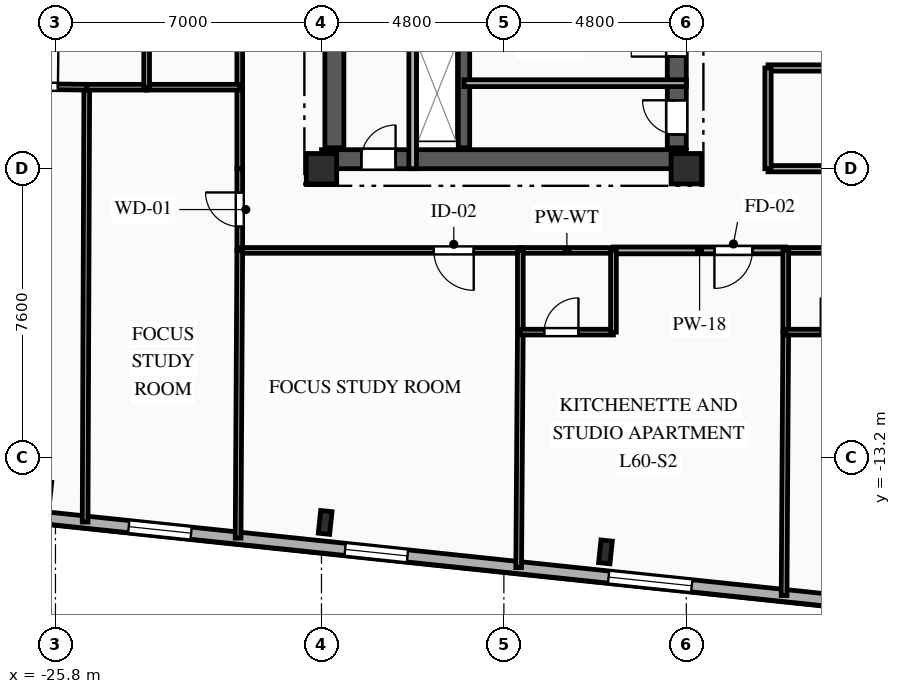
"""IFC4 building model, lengths in metres.
Left out: names, types, materials, properties, quantities, classifications, styles, units other than length and angle.
Written with IfcOpenShell. Run it as: python <this file> out.ifc"""

import sys

from ifc_helpers import new_model, si_unit, direction, frame, frame_2d, origin, origin_2d, place, context, subcontext, project, spatial, rectangle, i_section, extrude, element, fill, save


model = new_model("IFC4")
c1 = context("Model", 3, precision=1e-05, world=origin(), true_north=direction((0.0, 1.0)))
c2 = subcontext(c1, "Body", "Model", "MODEL_VIEW")
j1 = project(units=[si_unit("LENGTHUNIT", "METRE"), si_unit("PLANEANGLEUNIT", "RADIAN")], contexts=[c1])
p1 = place(None, origin())
s1 = spatial("IfcSite", under=j1, at=p1, CompositionType="ELEMENT")
p2 = place(p1, origin())
s2 = spatial("IfcBuilding", under=s1, at=p2, CompositionType="ELEMENT")
p3 = place(p2, frame((0.0, 0.0, 213.15)))
s3 = spatial("IfcBuildingStorey", under=s2, at=p3, CompositionType="ELEMENT", Elevation=213.15)
for number, where, z_axis, x_axis in (
    (1, (-18.8, -5.6, 0.0), (0.0, 0.0, 1.0), (1.0, 0.0, 0.0)),
    (2, (-9.2, -5.6, 0.0), (0.0, 0.0, 1.0), (1.0, 0.0, 0.0)),
):
    element("IfcColumn", number, at=place(p3, frame(where, z_axis=z_axis, x_axis=x_axis)), inside=s3, PredefinedType="COLUMN", context=c2, shape_type="SweptSolid", body=[
        extrude(rectangle(XDim=0.8, YDim=0.8, at=origin_2d()), origin(), (0.0, 0.0, 1.0), 3.35),
    ])
for number, where, z_axis, x_axis in (
    (3, (-26.079, -14.133, 0.0), (0.0, 0.0, 1.0), (0.995, -0.105, 0.0)),
    (4, (-18.703, -14.908, 0.0), (0.0, 0.0, 1.0), (0.995, -0.105, 0.0)),
    (5, (-11.327, -15.683, 0.0), (0.0, 0.0, 1.0), (0.995, -0.105, 0.0)),
):
    element("IfcColumn", number, at=place(p3, frame(where, z_axis=z_axis, x_axis=x_axis)), inside=s3, PredefinedType="COLUMN", context=c2, shape_type="SweptSolid", body=[
        extrude(i_section(OverallWidth=0.3, OverallDepth=0.6, WebThickness=0.015, FlangeThickness=0.03, FilletRadius=0.027, at=origin_2d()), origin(), (0.0, 0.0, 1.0), 3.35),
    ])
p4 = place(p3, frame((18.756, -19.498, 0.0), z_axis=(0.0, 0.0, 1.0), x_axis=(-0.994522060044, 0.104526896475, 0.0)))
e6 = element("IfcWall", 6, at=p4, inside=s3, PredefinedType="SOLIDWALL", context=c2, shape_type="SweptSolid", body=[
    extrude(rectangle(XDim=45.8, YDim=0.32, at=frame_2d((22.9, 0.0))), origin(), (0.0, 0.0, 1.0), 3.04),
])
p5 = place(p4, frame((1.657, 0.0, 0.85)))
e7 = element("IfcOpeningElement", 7, at=p5, cuts=e6, PredefinedType="OPENING", context=c2, shape_type="SweptSolid", body=[
    extrude(rectangle(XDim=1.65, YDim=1.85, at=frame_2d((0.825, 0.925))), frame((0.0, 0.17, 0.0), z_axis=(0.0, -1.0, 0.0), x_axis=(1.0, 0.0, 0.0)), (0.0, 0.0, 1.0), 0.34),
])
p6 = place(p4, frame((6.907, 0.0, 0.85)))
e8 = element("IfcOpeningElement", 8, at=p6, cuts=e6, PredefinedType="OPENING", context=c2, shape_type="SweptSolid", body=[
    extrude(rectangle(XDim=2.2, YDim=1.85, at=frame_2d((1.1, 0.925))), frame((0.0, 0.17, 0.0), z_axis=(0.0, -1.0, 0.0), x_axis=(1.0, 0.0, 0.0)), (0.0, 0.0, 1.0), 0.34),
])
p7 = place(p4, frame((13.953, 0.0, 0.85)))
e9 = element("IfcOpeningElement", 9, at=p7, cuts=e6, PredefinedType="OPENING", context=c2, shape_type="SweptSolid", body=[
    extrude(rectangle(XDim=2.2, YDim=1.85, at=frame_2d((1.1, 0.925))), frame((0.0, 0.17, 0.0), z_axis=(0.0, -1.0, 0.0), x_axis=(1.0, 0.0, 0.0)), (0.0, 0.0, 1.0), 0.34),
])
p8 = place(p4, frame((20.959, 0.0, 0.85)))
e10 = element("IfcOpeningElement", 10, at=p8, cuts=e6, PredefinedType="OPENING", context=c2, shape_type="SweptSolid", body=[
    extrude(rectangle(XDim=2.2, YDim=1.85, at=frame_2d((1.1, 0.925))), frame((0.0, 0.17, 0.0), z_axis=(0.0, -1.0, 0.0), x_axis=(1.0, 0.0, 0.0)), (0.0, 0.0, 1.0), 0.34),
])
p9 = place(p4, frame((27.965, 0.0, 0.85)))
e11 = element("IfcOpeningElement", 11, at=p9, cuts=e6, PredefinedType="OPENING", context=c2, shape_type="SweptSolid", body=[
    extrude(rectangle(XDim=2.2, YDim=1.85, at=frame_2d((1.1, 0.925))), frame((0.0, 0.17, 0.0), z_axis=(0.0, -1.0, 0.0), x_axis=(1.0, 0.0, 0.0)), (0.0, 0.0, 1.0), 0.34),
])
p10 = place(p4, frame((35.487, 0.0, 0.85)))
e12 = element("IfcOpeningElement", 12, at=p10, cuts=e6, PredefinedType="OPENING", context=c2, shape_type="SweptSolid", body=[
    extrude(rectangle(XDim=1.65, YDim=1.85, at=frame_2d((0.825, 0.925))), frame((0.0, 0.17, 0.0), z_axis=(0.0, -1.0, 0.0), x_axis=(1.0, 0.0, 0.0)), (0.0, 0.0, 1.0), 0.34),
])
p11 = place(p4, frame((41.212, 0.0, 0.85)))
e13 = element("IfcOpeningElement", 13, at=p11, cuts=e6, PredefinedType="OPENING", context=c2, shape_type="SweptSolid", body=[
    extrude(rectangle(XDim=1.65, YDim=1.85, at=frame_2d((0.825, 0.925))), frame((0.0, 0.17, 0.0), z_axis=(0.0, -1.0, 0.0), x_axis=(1.0, 0.0, 0.0)), (0.0, 0.0, 1.0), 0.34),
])
p12 = place(p3, frame((-18.8, -5.35, 0.0), z_axis=(0.0, 0.0, 1.0), x_axis=(1.0, 0.0, 0.0)))
e14 = element("IfcWall", 14, at=p12, inside=s3, PredefinedType="SHEAR", context=c2, shape_type="SweptSolid", body=[
    extrude(rectangle(XDim=9.6, YDim=0.5, at=frame_2d((4.8, 0.0))), origin(), (0.0, 0.0, 1.0), 3.04),
])
p13 = place(p12, frame((1.05, 0.0, 0.0)))
e15 = element("IfcOpeningElement", 15, at=p13, cuts=e14, PredefinedType="OPENING", context=c2, shape_type="SweptSolid", body=[
    extrude(rectangle(XDim=0.9, YDim=2.1, at=frame_2d((0.45, 1.05))), frame((0.0, 0.26, 0.0), z_axis=(0.0, -1.0, 0.0), x_axis=(1.0, 0.0, 0.0)), (0.0, 0.0, 1.0), 0.52),
])
p14 = place(p3, frame((-18.46, -5.05, 0.0), z_axis=(0.0, 0.0, 1.0), x_axis=(0.0, 1.0, 0.0)))
e16 = element("IfcWall", 16, at=p14, inside=s3, PredefinedType="SHEAR", context=c2, shape_type="SweptSolid", body=[
    extrude(rectangle(XDim=10.1, YDim=0.5, at=frame_2d((5.05, 0.0))), origin(), (0.0, 0.0, 1.0), 3.04),
])
p15 = place(p3, frame((-9.45, -5.05, 0.0), z_axis=(0.0, 0.0, 1.0), x_axis=(0.0, 1.0, 0.0)))
e17 = element("IfcWall", 17, at=p15, inside=s3, PredefinedType="SHEAR", context=c2, shape_type="SweptSolid", body=[
    extrude(rectangle(XDim=10.1, YDim=0.5, at=frame_2d((5.05, 0.0))), origin(), (0.0, 0.0, 1.0), 3.04),
])
p16 = place(p15, frame((7.15, 0.0, 0.0)))
e18 = element("IfcOpeningElement", 18, at=p16, cuts=e17, PredefinedType="OPENING", context=c2, shape_type="SweptSolid", body=[
    extrude(rectangle(XDim=0.9, YDim=2.1, at=frame_2d((0.45, 1.05))), frame((0.0, 0.26, 0.0), z_axis=(0.0, -1.0, 0.0), x_axis=(1.0, 0.0, 0.0)), (0.0, 0.0, 1.0), 0.52),
])
p17 = place(p15, frame((2.4, 0.0, 0.0)))
e19 = element("IfcOpeningElement", 19, at=p17, cuts=e17, PredefinedType="OPENING", context=c2, shape_type="SweptSolid", body=[
    extrude(rectangle(XDim=1.2, YDim=2.15, at=frame_2d((0.6, 1.075))), frame((0.0, 0.26, 0.0), z_axis=(0.0, -1.0, 0.0), x_axis=(1.0, 0.0, 0.0)), (0.0, 0.0, 1.0), 0.52),
])
p18 = place(p15, frame((0.35, 0.0, 0.0)))
e20 = element("IfcOpeningElement", 20, at=p18, cuts=e17, PredefinedType="OPENING", context=c2, shape_type="SweptSolid", body=[
    extrude(rectangle(XDim=0.9, YDim=2.1, at=frame_2d((0.45, 1.05))), frame((0.0, 0.26, 0.0), z_axis=(0.0, -1.0, 0.0), x_axis=(1.0, 0.0, 0.0)), (0.0, 0.0, 1.0), 0.52),
])
p19 = place(p15, frame((5.0, 0.0, 0.0)))
e21 = element("IfcOpeningElement", 21, at=p19, cuts=e17, PredefinedType="OPENING", context=c2, shape_type="SweptSolid", body=[
    extrude(rectangle(XDim=0.9, YDim=2.1, at=frame_2d((0.45, 1.05))), frame((0.0, 0.26, 0.0), z_axis=(0.0, -1.0, 0.0), x_axis=(1.0, 0.0, 0.0)), (0.0, 0.0, 1.0), 0.52),
])
p20 = place(p3, frame((-15.05, -5.05, 0.0), z_axis=(0.0, 0.0, 1.0), x_axis=(0.0, 1.0, 0.0)))
e22 = element("IfcWall", 22, at=p20, inside=s3, PredefinedType="SHEAR", context=c2, shape_type="SweptSolid", body=[
    extrude(rectangle(XDim=10.1, YDim=0.3, at=frame_2d((5.05, 0.0))), origin(), (0.0, 0.0, 1.0), 3.04),
])
p21 = place(p3, frame((-16.4, -5.6, 0.0), z_axis=(0.0, 0.0, 1.0), x_axis=(0.0, 1.0, 0.0)))
e23 = element("IfcWall", 23, at=p21, inside=s3, PredefinedType="PARTITIONING", context=c2, shape_type="SweptSolid", body=[
    extrude(rectangle(XDim=3.49, YDim=0.2, at=frame_2d((1.745, 0.0))), origin(), (0.0, 0.0, 1.0), 3.04),
])
p22 = place(p3, frame((-15.05, -3.35, 0.0), z_axis=(0.0, 0.0, 1.0), x_axis=(1.0, 0.0, 0.0)))
e24 = element("IfcWall", 24, at=p22, inside=s3, PredefinedType="PARTITIONING", context=c2, shape_type="SweptSolid", body=[
    extrude(rectangle(XDim=5.85, YDim=0.18, at=frame_2d((2.925, 0.0))), origin(), (0.0, 0.0, 1.0), 2.755),
])
p23 = place(p3, frame((-20.95, -7.75, 0.0), z_axis=(0.0, 0.0, 1.0), x_axis=(0.0, 1.0, 0.0)))
e25 = element("IfcWall", 25, at=p23, inside=s3, PredefinedType="PARTITIONING", context=c2, shape_type="SweptSolid", body=[
    extrude(rectangle(XDim=2.15, YDim=0.15, at=frame_2d((1.075, 0.0))), origin(), (0.0, 0.0, 1.0), 3.04),
])
p24 = place(p23, frame((0.625, 0.0, 0.0)))
e26 = element("IfcOpeningElement", 26, at=p24, cuts=e25, PredefinedType="OPENING", context=c2, shape_type="SweptSolid", body=[
    extrude(rectangle(XDim=0.9, YDim=2.1, at=frame_2d((0.45, 1.05))), frame((0.0, 0.085, 0.0), z_axis=(0.0, -1.0, 0.0), x_axis=(1.0, 0.0, 0.0)), (0.0, 0.0, 1.0), 0.17),
])
p25 = place(p3, frame((-13.567, -7.75, 0.0), z_axis=(0.0, 0.0, 1.0), x_axis=(-1.0, 0.0, 0.0)))
e27 = element("IfcWall", 27, at=p25, inside=s3, PredefinedType="PARTITIONING", context=c2, shape_type="SweptSolid", body=[
    extrude(rectangle(XDim=7.383, YDim=0.15, at=frame_2d((3.691, 0.0))), origin(), (0.0, 0.0, 1.0), 3.04),
])
p26 = place(p25, frame((1.227, 0.0, 0.0)))
e28 = element("IfcOpeningElement", 28, at=p26, cuts=e27, PredefinedType="OPENING", context=c2, shape_type="SweptSolid", body=[
    extrude(rectangle(XDim=1.05, YDim=2.15, at=frame_2d((0.525, 1.075))), frame((0.0, 0.085, 0.0), z_axis=(0.0, -1.0, 0.0), x_axis=(1.0, 0.0, 0.0)), (0.0, 0.0, 1.0), 0.17),
])
p27 = place(p3, frame((-6.583, -7.75, 0.0), z_axis=(0.0, 0.0, 1.0), x_axis=(-1.0, 0.0, 0.0)))
e29 = element("IfcWall", 29, at=p27, inside=s3, PredefinedType="PARTITIONING", context=c2, shape_type="SweptSolid", body=[
    extrude(rectangle(XDim=4.534, YDim=0.18, at=frame_2d((2.267, 0.0))), origin(), (0.0, 0.0, 1.0), 3.04),
])
p28 = place(p27, frame((0.877, 0.0, 0.0)))
e30 = element("IfcOpeningElement", 30, at=p28, cuts=e29, PredefinedType="OPENING", context=c2, shape_type="SweptSolid", body=[
    extrude(rectangle(XDim=1.0, YDim=2.15, at=frame_2d((0.5, 1.075))), frame((0.0, 0.1, 0.0), z_axis=(0.0, -1.0, 0.0), x_axis=(1.0, 0.0, 0.0)), (0.0, 0.0, 1.0), 0.2),
])
for number, where, z_axis, x_axis in (
    (31, (-11.117, -7.75, 0.0), (0.0, 0.0, 1.0), (-1.0, 0.0, 0.0)),
    (32, (-4.133, -7.75, 0.0), (0.0, 0.0, 1.0), (-1.0, 0.0, 0.0)),
):
    element("IfcWall", number, at=place(p3, frame(where, z_axis=z_axis, x_axis=x_axis)), inside=s3, PredefinedType="PLUMBINGWALL", context=c2, shape_type="SweptSolid", body=[
        extrude(rectangle(XDim=2.45, YDim=0.15, at=frame_2d((1.225, 0.0))), origin(), (0.0, 0.0, 1.0), 3.04),
    ])
p29 = place(p3, frame((-7.05, -5.6, 0.0), z_axis=(0.0, 0.0, 1.0), x_axis=(1.0, 0.0, 0.0)))
e33 = element("IfcWall", 33, at=p29, inside=s3, PredefinedType="PARTITIONING", context=c2, shape_type="SweptSolid", body=[
    extrude(rectangle(XDim=7.05, YDim=0.165, at=frame_2d((3.525, 0.0))), origin(), (0.0, 0.0, 1.0), 2.525),
])
p30 = place(p3, frame((-20.95, -5.6, 0.0), z_axis=(0.0, 0.0, 1.0), x_axis=(0.0, 1.0, 0.0)))
e34 = element("IfcWall", 34, at=p30, inside=s3, PredefinedType="PARTITIONING", context=c2, shape_type="SweptSolid", body=[
    extrude(rectangle(XDim=2.144, YDim=0.15, at=frame_2d((1.072, 0.0))), origin(), (0.0, 0.0, 1.0), 3.04),
])
p31 = place(p3, frame((-20.95, -3.456, 0.0), z_axis=(0.0, 0.0, 1.0), x_axis=(0.0, 1.0, 0.0)))
e35 = element("IfcWall", 35, at=p31, inside=s3, PredefinedType="PLUMBINGWALL", context=c2, shape_type="SweptSolid", body=[
    extrude(rectangle(XDim=2.15, YDim=0.15, at=frame_2d((1.075, 0.0))), origin(), (0.0, 0.0, 1.0), 3.04),
])
p32 = place(p3, frame((7.05, -2.95, 0.0), z_axis=(0.0, 0.0, 1.0), x_axis=(-1.0, 0.0, 0.0)))
e36 = element("IfcWall", 36, at=p32, inside=s3, PredefinedType="PARTITIONING", context=c2, shape_type="SweptSolid", body=[
    extrude(rectangle(XDim=14.1, YDim=0.165, at=frame_2d((7.05, 0.0))), origin(), (0.0, 0.0, 1.0), 3.04),
])
p33 = place(p32, frame((6.475, 0.0, 0.0)))
e37 = element("IfcOpeningElement", 37, at=p33, cuts=e36, PredefinedType="OPENING", context=c2, shape_type="SweptSolid", body=[
    extrude(rectangle(XDim=1.15, YDim=2.15, at=frame_2d((0.575, 1.075))), frame((0.0, 0.093, 0.0), z_axis=(0.0, -1.0, 0.0), x_axis=(1.0, 0.0, 0.0)), (0.0, 0.0, 1.0), 0.185),
])
p34 = place(p3, frame((-7.05, -2.95, 0.0), z_axis=(0.0, 0.0, 1.0), x_axis=(0.0, -1.0, 0.0)))
e38 = element("IfcWall", 38, at=p34, inside=s3, PredefinedType="PARTITIONING", context=c2, shape_type="SweptSolid", body=[
    extrude(rectangle(XDim=2.65, YDim=0.165, at=frame_2d((1.325, 0.0))), origin(), (0.0, 0.0, 1.0), 3.04),
])
p35 = place(p3, frame((-24.976, -3.456, 0.0), z_axis=(0.0, 0.0, 1.0), x_axis=(-0.003840873, -0.99999262382, 0.0)))
e39 = element("IfcWall", 39, at=p35, inside=s3, PredefinedType="PARTITIONING", context=c2, shape_type="SweptSolid", body=[
    extrude(rectangle(XDim=11.441, YDim=0.15, at=frame_2d((5.721, 0.0))), origin(), (0.0, 0.0, 1.0), 3.04),
])
p36 = place(p3, frame((-28.622, -3.412, 0.0), z_axis=(0.0, 0.0, 1.0), x_axis=(0.999927389555, -0.01205054433, 0.0)))
e40 = element("IfcWall", 40, at=p36, inside=s3, PredefinedType="PARTITIONING", context=c2, shape_type="SweptSolid", body=[
    extrude(rectangle(XDim=3.647, YDim=0.15, at=frame_2d((1.823, 0.0))), origin(), (0.0, 0.0, 1.0), 3.04),
])
p37 = place(p36, frame((1.837, 0.0, 0.0)))
e41 = element("IfcOpeningElement", 41, at=p37, cuts=e40, PredefinedType="OPENING", context=c2, shape_type="SweptSolid", body=[
    extrude(rectangle(XDim=1.05, YDim=2.15, at=frame_2d((0.525, 1.075))), frame((0.0, 0.085, 0.0), z_axis=(0.0, -1.0, 0.0), x_axis=(1.0, 0.0, 0.0)), (0.0, 0.0, 1.0), 0.17),
])
p38 = place(p3, frame((-24.976, -3.456, 0.0), z_axis=(0.0, 0.0, 1.0), x_axis=(1.0, 0.0, 0.0)))
e42 = element("IfcWall", 42, at=p38, inside=s3, PredefinedType="PARTITIONING", context=c2, shape_type="SweptSolid", body=[
    extrude(rectangle(XDim=1.576, YDim=0.15, at=frame_2d((0.788, 0.0))), origin(), (0.0, 0.0, 1.0), 3.04),
])
p39 = place(p3, frame((-23.4, -3.456, 0.0), z_axis=(0.0, 0.0, 1.0), x_axis=(1.0, 0.0, 0.0)))
e43 = element("IfcWall", 43, at=p39, inside=s3, PredefinedType="PLUMBINGWALL", context=c2, shape_type="SweptSolid", body=[
    extrude(rectangle(XDim=2.45, YDim=0.15, at=frame_2d((1.225, 0.0))), origin(), (0.0, 0.0, 1.0), 3.04),
])
p40 = place(p3, frame((-20.95, -7.75, 0.0), z_axis=(0.0, 0.0, 1.0), x_axis=(-0.005804668564, -0.99998315277, 0.0)))
e44 = element("IfcWall", 44, at=p40, inside=s3, PredefinedType="PARTITIONING", context=c2, shape_type="SweptSolid", body=[
    extrude(rectangle(XDim=7.571, YDim=0.15, at=frame_2d((3.785, 0.0))), origin(), (0.0, 0.0, 1.0), 3.04),
])
p41 = place(p3, frame((-23.4, -1.306, 0.0), z_axis=(0.0, 0.0, 1.0), x_axis=(0.0, -1.0, 0.0)))
e45 = element("IfcWall", 45, at=p41, inside=s3, PredefinedType="PLUMBINGWALL", context=c2, shape_type="SweptSolid", body=[
    extrude(rectangle(XDim=2.15, YDim=0.15, at=frame_2d((1.075, 0.0))), origin(), (0.0, 0.0, 1.0), 2.695),
])
p42 = place(p3, frame((-13.567, -9.9, 0.0), z_axis=(0.0, 0.0, 1.0), x_axis=(-0.007091740814, -0.99997485329, 0.0)))
e46 = element("IfcWall", 46, at=p42, inside=s3, PredefinedType="PARTITIONING", context=c2, shape_type="SweptSolid", body=[
    extrude(rectangle(XDim=6.197, YDim=0.15, at=frame_2d((3.098, 0.0))), origin(), (0.0, 0.0, 1.0), 3.04),
])
p43 = place(p3, frame((-13.567, -7.75, 0.0), z_axis=(0.0, 0.0, 1.0), x_axis=(0.0, -1.0, 0.0)))
e47 = element("IfcWall", 47, at=p43, inside=s3, PredefinedType="PLUMBINGWALL", context=c2, shape_type="SweptSolid", body=[
    extrude(rectangle(XDim=2.15, YDim=0.15, at=frame_2d((1.075, 0.0))), origin(), (0.0, 0.0, 1.0), 3.04),
])
p44 = place(p3, frame((-13.567, -9.9, 0.0), z_axis=(0.0, 0.0, 1.0), x_axis=(1.0, 0.0, 0.0)))
e48 = element("IfcWall", 48, at=p44, inside=s3, PredefinedType="PLUMBINGWALL", context=c2, shape_type="SweptSolid", body=[
    extrude(rectangle(XDim=2.45, YDim=0.15, at=frame_2d((1.225, 0.0))), origin(), (0.0, 0.0, 1.0), 3.04),
])
p45 = place(p44, frame((0.629, 0.0, 0.0)))
e49 = element("IfcOpeningElement", 49, at=p45, cuts=e48, PredefinedType="OPENING", context=c2, shape_type="SweptSolid", body=[
    extrude(rectangle(XDim=0.9, YDim=2.1, at=frame_2d((0.45, 1.05))), frame((0.0, 0.085, 0.0), z_axis=(0.0, -1.0, 0.0), x_axis=(1.0, 0.0, 0.0)), (0.0, 0.0, 1.0), 0.17),
])
p46 = place(p3, frame((-11.117, -9.9, 0.0), z_axis=(0.0, 0.0, 1.0), x_axis=(0.0, 1.0, 0.0)))
e50 = element("IfcWall", 50, at=p46, inside=s3, PredefinedType="PLUMBINGWALL", context=c2, shape_type="SweptSolid", body=[
    extrude(rectangle(XDim=2.15, YDim=0.15, at=frame_2d((1.075, 0.0))), origin(), (0.0, 0.0, 1.0), 3.04),
])
p47 = place(p3, frame((-6.583, -9.9, 0.0), z_axis=(0.0, 0.0, 1.0), x_axis=(-0.006340579882, -0.999979898321, 0.0)))
e51 = element("IfcWall", 51, at=p47, inside=s3, PredefinedType="PARTITIONING", context=c2, shape_type="SweptSolid", body=[
    extrude(rectangle(XDim=6.931, YDim=0.15, at=frame_2d((3.465, 0.0))), origin(), (0.0, 0.0, 1.0), 3.04),
])
p48 = place(p3, frame((-6.583, -7.75, 0.0), z_axis=(0.0, 0.0, 1.0), x_axis=(0.0, -1.0, 0.0)))
e52 = element("IfcWall", 52, at=p48, inside=s3, PredefinedType="PLUMBINGWALL", context=c2, shape_type="SweptSolid", body=[
    extrude(rectangle(XDim=2.15, YDim=0.15, at=frame_2d((1.075, 0.0))), origin(), (0.0, 0.0, 1.0), 3.04),
])
p49 = place(p3, frame((-6.583, -9.9, 0.0), z_axis=(0.0, 0.0, 1.0), x_axis=(1.0, 0.0, 0.0)))
e53 = element("IfcWall", 53, at=p49, inside=s3, PredefinedType="PLUMBINGWALL", context=c2, shape_type="SweptSolid", body=[
    extrude(rectangle(XDim=2.45, YDim=0.15, at=frame_2d((1.225, 0.0))), origin(), (0.0, 0.0, 1.0), 3.04),
])
p50 = place(p49, frame((0.921, 0.0, 0.0)))
e54 = element("IfcOpeningElement", 54, at=p50, cuts=e53, PredefinedType="OPENING", context=c2, shape_type="SweptSolid", body=[
    extrude(rectangle(XDim=0.9, YDim=2.1, at=frame_2d((0.45, 1.05))), frame((0.0, 0.085, 0.0), z_axis=(0.0, -1.0, 0.0), x_axis=(1.0, 0.0, 0.0)), (0.0, 0.0, 1.0), 0.17),
])
p51 = place(p9, origin())
e55 = element("IfcWindow", 55, at=p51, inside=s3, PartitioningType="SINGLE_PANEL", PredefinedType="WINDOW", context=c2, shape_type="SweptSolid", body=[
    extrude(rectangle(XDim=2.2, YDim=1.85, at=frame_2d((1.1, 0.925))), frame((0.0, 0.03, 0.0), z_axis=(0.0, -1.0, 0.0), x_axis=(1.0, 0.0, 0.0)), (0.0, 0.0, 1.0), 0.06),
])
fill(e11, e55)
p52 = place(p10, origin())
e56 = element("IfcWindow", 56, at=p52, inside=s3, PartitioningType="SINGLE_PANEL", PredefinedType="WINDOW", context=c2, shape_type="SweptSolid", body=[
    extrude(rectangle(XDim=1.65, YDim=1.85, at=frame_2d((0.825, 0.925))), frame((0.0, 0.03, 0.0), z_axis=(0.0, -1.0, 0.0), x_axis=(1.0, 0.0, 0.0)), (0.0, 0.0, 1.0), 0.06),
])
fill(e12, e56)
p53 = place(p11, origin())
e57 = element("IfcWindow", 57, at=p53, inside=s3, PartitioningType="SINGLE_PANEL", PredefinedType="WINDOW", context=c2, shape_type="SweptSolid", body=[
    extrude(rectangle(XDim=1.65, YDim=1.85, at=frame_2d((0.825, 0.925))), frame((0.0, 0.03, 0.0), z_axis=(0.0, -1.0, 0.0), x_axis=(1.0, 0.0, 0.0)), (0.0, 0.0, 1.0), 0.06),
])
fill(e13, e57)
p54 = place(p13, origin())
e58 = element("IfcDoor", 58, at=p54, inside=s3, OperationType="SINGLE_SWING_RIGHT", PredefinedType="DOOR", context=c2, shape_type="SweptSolid", body=[
    extrude(rectangle(XDim=0.9, YDim=2.1, at=frame_2d((0.45, 1.05))), frame((0.0, 0.025, 0.0), z_axis=(0.0, -1.0, 0.0), x_axis=(1.0, 0.0, 0.0)), (0.0, 0.0, 1.0), 0.05),
])
fill(e15, e58)
p55 = place(p17, origin())
e59 = element("IfcDoor", 59, at=p55, inside=s3, OperationType="SINGLE_SWING_LEFT", PredefinedType="DOOR", context=c2, shape_type="SweptSolid", body=[
    extrude(rectangle(XDim=1.2, YDim=2.15, at=frame_2d((0.6, 1.075))), frame((0.0, 0.025, 0.0), z_axis=(0.0, -1.0, 0.0), x_axis=(1.0, 0.0, 0.0)), (0.0, 0.0, 1.0), 0.05),
])
fill(e19, e59)
p56 = place(p18, origin())
e60 = element("IfcDoor", 60, at=p56, inside=s3, OperationType="SINGLE_SWING_RIGHT", PredefinedType="DOOR", context=c2, shape_type="SweptSolid", body=[
    extrude(rectangle(XDim=0.9, YDim=2.1, at=frame_2d((0.45, 1.05))), frame((0.0, 0.025, 0.0), z_axis=(0.0, -1.0, 0.0), x_axis=(1.0, 0.0, 0.0)), (0.0, 0.0, 1.0), 0.05),
])
fill(e20, e60)
p57 = place(p24, origin())
e61 = element("IfcDoor", 61, at=p57, inside=s3, OperationType="SINGLE_SWING_RIGHT", PredefinedType="DOOR", context=c2, shape_type="SweptSolid", body=[
    extrude(rectangle(XDim=0.9, YDim=2.1, at=frame_2d((0.45, 1.05))), frame((0.0, 0.025, 0.0), z_axis=(0.0, -1.0, 0.0), x_axis=(1.0, 0.0, 0.0)), (0.0, 0.0, 1.0), 0.05),
])
fill(e26, e61)
p58 = place(p26, origin())
e62 = element("IfcDoor", 62, at=p58, inside=s3, OperationType="SINGLE_SWING_LEFT", PredefinedType="DOOR", context=c2, shape_type="SweptSolid", body=[
    extrude(rectangle(XDim=1.05, YDim=2.15, at=frame_2d((0.525, 1.075))), frame((0.0, 0.025, 0.0), z_axis=(0.0, -1.0, 0.0), x_axis=(1.0, 0.0, 0.0)), (0.0, 0.0, 1.0), 0.05),
])
fill(e28, e62)
p59 = place(p28, origin())
e63 = element("IfcDoor", 63, at=p59, inside=s3, OperationType="SINGLE_SWING_RIGHT", PredefinedType="DOOR", context=c2, shape_type="SweptSolid", body=[
    extrude(rectangle(XDim=1.0, YDim=2.15, at=frame_2d((0.5, 1.075))), frame((0.0, 0.025, 0.0), z_axis=(0.0, -1.0, 0.0), x_axis=(1.0, 0.0, 0.0)), (0.0, 0.0, 1.0), 0.05),
])
fill(e30, e63)
p60 = place(p37, origin())
e64 = element("IfcDoor", 64, at=p60, inside=s3, OperationType="SINGLE_SWING_RIGHT", PredefinedType="DOOR", context=c2, shape_type="SweptSolid", body=[
    extrude(rectangle(XDim=1.05, YDim=2.15, at=frame_2d((0.525, 1.075))), frame((0.0, 0.025, 0.0), z_axis=(0.0, -1.0, 0.0), x_axis=(1.0, 0.0, 0.0)), (0.0, 0.0, 1.0), 0.05),
])
fill(e41, e64)
p61 = place(p45, origin())
e65 = element("IfcDoor", 65, at=p61, inside=s3, OperationType="SINGLE_SWING_RIGHT", PredefinedType="DOOR", context=c2, shape_type="SweptSolid", body=[
    extrude(rectangle(XDim=0.9, YDim=2.1, at=frame_2d((0.45, 1.05))), frame((0.0, 0.025, 0.0), z_axis=(0.0, -1.0, 0.0), x_axis=(1.0, 0.0, 0.0)), (0.0, 0.0, 1.0), 0.05),
])
fill(e49, e65)
p62 = place(p50, origin())
e66 = element("IfcDoor", 66, at=p62, inside=s3, OperationType="SINGLE_SWING_LEFT", PredefinedType="DOOR", context=c2, shape_type="SweptSolid", body=[
    extrude(rectangle(XDim=0.9, YDim=2.1, at=frame_2d((0.45, 1.05))), frame((0.0, 0.025, 0.0), z_axis=(0.0, -1.0, 0.0), x_axis=(1.0, 0.0, 0.0)), (0.0, 0.0, 1.0), 0.05),
])
fill(e54, e66)
save(model, sys.argv[1])
